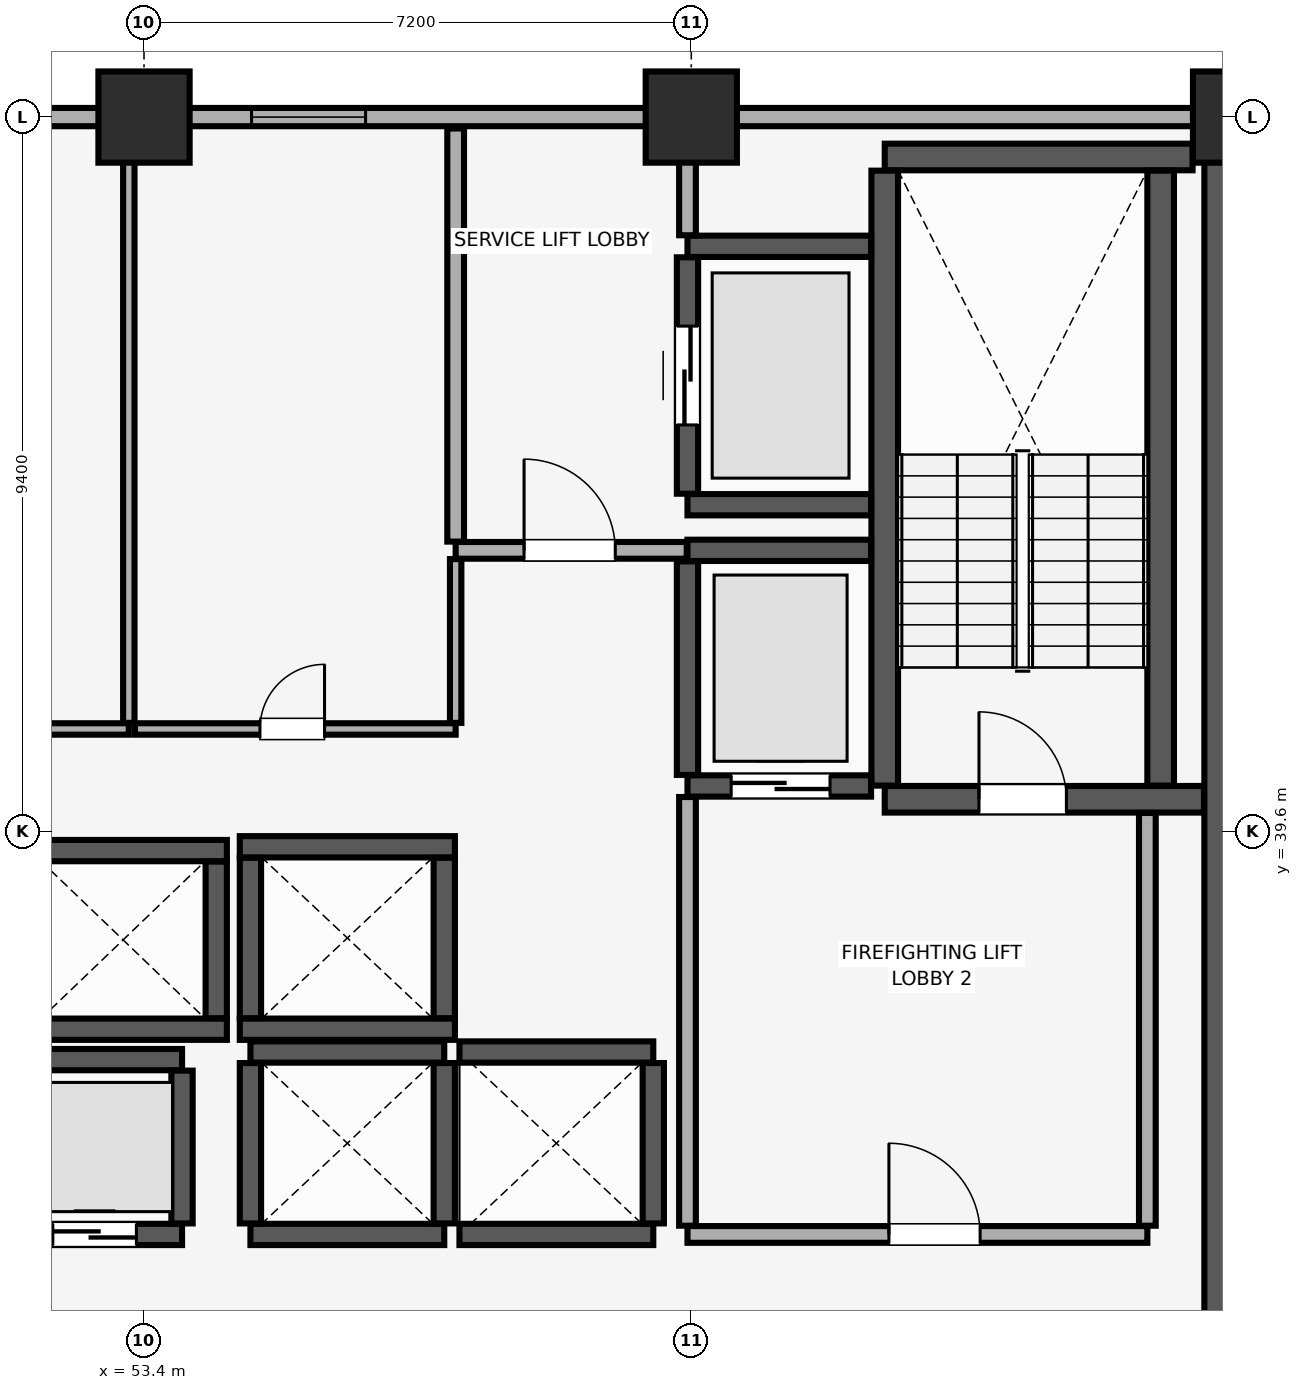
"""IFC4 building model, lengths in metres.
Left out: names, types, materials, properties, quantities, classifications, styles, units other than length and angle.
Written with IfcOpenShell. Run it as: python <this file> out.ifc"""

import sys

from ifc_helpers import new_model, si_unit, direction, frame, frame_2d, origin, origin_2d, place, context, subcontext, project, spatial, rectangle, extrude, element, fill, save


model = new_model("IFC4")
c1 = context("Model", 3, precision=1e-05, world=origin(), true_north=direction((0.0, 1.0)))
c2 = subcontext(c1, "Body", "Model", "MODEL_VIEW")
j1 = project(units=[si_unit("LENGTHUNIT", "METRE"), si_unit("PLANEANGLEUNIT", "RADIAN")], contexts=[c1])
p1 = place(None, origin())
s1 = spatial("IfcSite", under=j1, at=p1, CompositionType="ELEMENT")
p2 = place(p1, origin())
s2 = spatial("IfcBuilding", under=s1, at=p2, CompositionType="ELEMENT")
p3 = place(p2, frame((0.0, 0.0, 135.35)))
s3 = spatial("IfcBuildingStorey", under=s2, at=p3, CompositionType="ELEMENT", Elevation=135.35)
for number, where, z_axis, x_axis in (
    (1, (53.4, 49.0, 0.0), (0.0, 0.0, 1.0), (1.0, 0.0, 0.0)),
    (2, (60.6, 49.0, 0.0), (0.0, 0.0, 1.0), (1.0, 0.0, 0.0)),
    (3, (67.8, 49.0, 0.0), (0.0, 0.0, 1.0), (1.0, 0.0, 0.0)),
):
    element("IfcColumn", number, at=place(p3, frame(where, z_axis=z_axis, x_axis=x_axis)), inside=s3, PredefinedType="COLUMN", context=c2, shape_type="SweptSolid", body=[
        extrude(rectangle(XDim=1.2, YDim=1.2, at=origin_2d()), origin(), (0.0, 0.0, 1.0), 3.56),
    ])
p4 = place(p3, frame((77.0, 49.0, 0.0), z_axis=(0.0, 0.0, 1.0), x_axis=(-1.0, 0.0, 0.0)))
e4 = element("IfcWall", 4, at=p4, inside=s3, PredefinedType="SOLIDWALL", context=c2, shape_type="SweptSolid", body=[
    extrude(rectangle(XDim=70.0, YDim=0.24, at=frame_2d((35.0, 0.0))), origin(), (0.0, 0.0, 1.0), 2.61),
])
p5 = place(p4, frame((63.7, 0.0, 0.85)))
e5 = element("IfcOpeningElement", 5, at=p5, cuts=e4, PredefinedType="OPENING", context=c2, shape_type="SweptSolid", body=[
    extrude(rectangle(XDim=3.0, YDim=1.5, at=frame_2d((1.5, 0.75))), frame((0.0, 0.13, 0.0), z_axis=(0.0, -1.0, 0.0), x_axis=(1.0, 0.0, 0.0)), (0.0, 0.0, 1.0), 0.26),
])
p6 = place(p4, frame((3.3, 0.0, 0.85)))
e6 = element("IfcOpeningElement", 6, at=p6, cuts=e4, PredefinedType="OPENING", context=c2, shape_type="SweptSolid", body=[
    extrude(rectangle(XDim=3.0, YDim=1.5, at=frame_2d((1.5, 0.75))), frame((0.0, 0.13, 0.0), z_axis=(0.0, -1.0, 0.0), x_axis=(1.0, 0.0, 0.0)), (0.0, 0.0, 1.0), 0.26),
])
p7 = place(p4, frame((48.565, 0.0, 0.9)))
e7 = element("IfcOpeningElement", 7, at=p7, cuts=e4, PredefinedType="OPENING", context=c2, shape_type="SweptSolid", body=[
    extrude(rectangle(XDim=1.5, YDim=1.4, at=frame_2d((0.75, 0.7))), frame((0.0, 0.13, 0.0), z_axis=(0.0, -1.0, 0.0), x_axis=(1.0, 0.0, 0.0)), (0.0, 0.0, 1.0), 0.26),
])
p8 = place(p4, frame((41.75, 0.0, 0.9)))
e8 = element("IfcOpeningElement", 8, at=p8, cuts=e4, PredefinedType="OPENING", context=c2, shape_type="SweptSolid", body=[
    extrude(rectangle(XDim=1.5, YDim=1.4, at=frame_2d((0.75, 0.7))), frame((0.0, 0.13, 0.0), z_axis=(0.0, -1.0, 0.0), x_axis=(1.0, 0.0, 0.0)), (0.0, 0.0, 1.0), 0.26),
])
p9 = place(p4, frame((25.3, 0.0, 0.9)))
e9 = element("IfcOpeningElement", 9, at=p9, cuts=e4, PredefinedType="OPENING", context=c2, shape_type="SweptSolid", body=[
    extrude(rectangle(XDim=1.5, YDim=1.4, at=frame_2d((0.75, 0.7))), frame((0.0, 0.13, 0.0), z_axis=(0.0, -1.0, 0.0), x_axis=(1.0, 0.0, 0.0)), (0.0, 0.0, 1.0), 0.26),
])
p10 = place(p4, frame((20.685, 0.0, 0.9)))
e10 = element("IfcOpeningElement", 10, at=p10, cuts=e4, PredefinedType="OPENING", context=c2, shape_type="SweptSolid", body=[
    extrude(rectangle(XDim=1.5, YDim=1.4, at=frame_2d((0.75, 0.7))), frame((0.0, 0.13, 0.0), z_axis=(0.0, -1.0, 0.0), x_axis=(1.0, 0.0, 0.0)), (0.0, 0.0, 1.0), 0.26),
])
p11 = place(p3, frame((67.8, 29.4, 0.0), z_axis=(0.0, 0.0, 1.0), x_axis=(0.0, 1.0, 0.0)))
e11 = element("IfcWall", 11, at=p11, inside=s3, PredefinedType="SHEAR", context=c2, shape_type="SweptSolid", body=[
    extrude(rectangle(XDim=19.2, YDim=0.9, at=frame_2d((9.6, 0.0))), origin(), (0.0, 0.0, 1.0), 3.56),
])
p12 = place(p3, frame((63.145, 40.025, 0.0), z_axis=(0.0, 0.0, 1.0), x_axis=(1.0, 0.0, 0.0)))
e12 = element("IfcWall", 12, at=p12, inside=s3, PredefinedType="SHEAR", context=c2, shape_type="SweptSolid", body=[
    extrude(rectangle(XDim=4.2, YDim=0.35, at=frame_2d((2.1, 0.0))), origin(), (0.0, 0.0, 1.0), 3.56),
])
p13 = place(p12, frame((1.24, 0.0, 0.0)))
e13 = element("IfcOpeningElement", 13, at=p13, cuts=e12, PredefinedType="OPENING", context=c2, shape_type="SweptSolid", body=[
    extrude(rectangle(XDim=1.15, YDim=2.15, at=frame_2d((0.575, 1.075))), frame((0.0, 0.185, 0.0), z_axis=(0.0, -1.0, 0.0), x_axis=(1.0, 0.0, 0.0)), (0.0, 0.0, 1.0), 0.37),
])
p14 = place(p3, frame((63.145, 48.475, 0.0), z_axis=(0.0, 0.0, 1.0), x_axis=(1.0, 0.0, 0.0)))
e14 = element("IfcWall", 14, at=p14, inside=s3, PredefinedType="SHEAR", context=c2, shape_type="SweptSolid", body=[
    extrude(rectangle(XDim=4.05, YDim=0.35, at=frame_2d((2.025, 0.0))), origin(), (0.0, 0.0, 1.0), 3.56),
])
for number, where, z_axis, x_axis in (
    (15, (63.145, 40.205, 0.0), (0.0, 0.0, 1.0), (0.0, 1.0, 0.0)),
    (16, (66.775, 40.205, 0.0), (0.0, 0.0, 1.0), (0.0, 1.0, 0.0)),
):
    element("IfcWall", number, at=place(p3, frame(where, z_axis=z_axis, x_axis=x_axis)), inside=s3, PredefinedType="SHEAR", context=c2, shape_type="SweptSolid", body=[
        extrude(rectangle(XDim=8.09, YDim=0.35, at=frame_2d((4.045, 0.0))), origin(), (0.0, 0.0, 1.0), 3.56),
    ])
p15 = place(p3, frame((51.6, 34.3, 0.0), z_axis=(0.0, 0.0, 1.0), x_axis=(1.0, 0.0, 0.0)))
e17 = element("IfcWall", 17, at=p15, inside=s3, PredefinedType="SHEAR", context=c2, shape_type="SweptSolid", body=[
    extrude(rectangle(XDim=2.3, YDim=0.28, at=frame_2d((1.15, 0.0))), origin(), (0.0, 0.0, 1.0), 3.56),
])
p16 = place(p15, frame((0.6, 0.0, 0.0)))
e18 = element("IfcOpeningElement", 18, at=p16, cuts=e17, PredefinedType="OPENING", context=c2, shape_type="SweptSolid", body=[
    extrude(rectangle(XDim=1.1, YDim=2.2, at=frame_2d((0.55, 1.1))), frame((0.0, 0.15, 0.0), z_axis=(0.0, -1.0, 0.0), x_axis=(1.0, 0.0, 0.0)), (0.0, 0.0, 1.0), 0.3),
])
p17 = place(p3, frame((51.6, 36.6, 0.0), z_axis=(0.0, 0.0, 1.0), x_axis=(1.0, 0.0, 0.0)))
e19 = element("IfcWall", 19, at=p17, inside=s3, PredefinedType="SHEAR", context=c2, shape_type="SweptSolid", body=[
    extrude(rectangle(XDim=2.3, YDim=0.28, at=frame_2d((1.15, 0.0))), origin(), (0.0, 0.0, 1.0), 3.56),
])
p18 = place(p3, frame((53.9, 34.445, 0.0), z_axis=(0.0, 0.0, 1.0), x_axis=(0.0, 1.0, 0.0)))
e20 = element("IfcWall", 20, at=p18, inside=s3, PredefinedType="SHEAR", context=c2, shape_type="SweptSolid", body=[
    extrude(rectangle(XDim=2.01, YDim=0.28, at=frame_2d((1.005, 0.0))), origin(), (0.0, 0.0, 1.0), 3.56),
])
for number, where, z_axis, x_axis in (
    (21, (51.9, 37.0, 0.0), (0.0, 0.0, 1.0), (1.0, 0.0, 0.0)),
    (22, (51.9, 39.35, 0.0), (0.0, 0.0, 1.0), (1.0, 0.0, 0.0)),
):
    element("IfcWall", number, at=place(p3, frame(where, z_axis=z_axis, x_axis=x_axis)), inside=s3, PredefinedType="SHEAR", context=c2, shape_type="SweptSolid", body=[
        extrude(rectangle(XDim=2.59, YDim=0.28, at=frame_2d((1.295, 0.0))), origin(), (0.0, 0.0, 1.0), 3.56),
    ])
p19 = place(p3, frame((54.35, 37.145, 0.0), z_axis=(0.0, 0.0, 1.0), x_axis=(0.0, 1.0, 0.0)))
e23 = element("IfcWall", 23, at=p19, inside=s3, PredefinedType="SHEAR", context=c2, shape_type="SweptSolid", body=[
    extrude(rectangle(XDim=2.06, YDim=0.28, at=frame_2d((1.03, 0.0))), origin(), (0.0, 0.0, 1.0), 3.56),
])
for number, where, z_axis, x_axis in (
    (24, (54.8, 34.3, 0.0), (0.0, 0.0, 1.0), (1.0, 0.0, 0.0)),
    (25, (54.8, 36.7, 0.0), (0.0, 0.0, 1.0), (1.0, 0.0, 0.0)),
):
    element("IfcWall", number, at=place(p3, frame(where, z_axis=z_axis, x_axis=x_axis)), inside=s3, PredefinedType="SHEAR", context=c2, shape_type="SweptSolid", body=[
        extrude(rectangle(XDim=2.55, YDim=0.28, at=frame_2d((1.275, 0.0))), origin(), (0.0, 0.0, 1.0), 3.56),
    ])
for number, where, z_axis, x_axis in (
    (26, (54.8, 34.445, 0.0), (0.0, 0.0, 1.0), (0.0, 1.0, 0.0)),
    (27, (57.35, 34.445, 0.0), (0.0, 0.0, 1.0), (0.0, 1.0, 0.0)),
):
    element("IfcWall", number, at=place(p3, frame(where, z_axis=z_axis, x_axis=x_axis)), inside=s3, PredefinedType="SHEAR", context=c2, shape_type="SweptSolid", body=[
        extrude(rectangle(XDim=2.11, YDim=0.28, at=frame_2d((1.055, 0.0))), origin(), (0.0, 0.0, 1.0), 3.56),
    ])
for number, where, z_axis, x_axis in (
    (28, (57.55, 34.3, 0.0), (0.0, 0.0, 1.0), (1.0, 0.0, 0.0)),
    (29, (57.55, 36.7, 0.0), (0.0, 0.0, 1.0), (1.0, 0.0, 0.0)),
):
    element("IfcWall", number, at=place(p3, frame(where, z_axis=z_axis, x_axis=x_axis)), inside=s3, PredefinedType="SHEAR", context=c2, shape_type="SweptSolid", body=[
        extrude(rectangle(XDim=2.55, YDim=0.28, at=frame_2d((1.275, 0.0))), origin(), (0.0, 0.0, 1.0), 3.56),
    ])
p20 = place(p3, frame((60.1, 34.445, 0.0), z_axis=(0.0, 0.0, 1.0), x_axis=(0.0, 1.0, 0.0)))
e30 = element("IfcWall", 30, at=p20, inside=s3, PredefinedType="SHEAR", context=c2, shape_type="SweptSolid", body=[
    extrude(rectangle(XDim=2.11, YDim=0.28, at=frame_2d((1.055, 0.0))), origin(), (0.0, 0.0, 1.0), 3.56),
])
for number, where, z_axis, x_axis in (
    (31, (54.66, 37.0, 0.0), (0.0, 0.0, 1.0), (1.0, 0.0, 0.0)),
    (32, (54.66, 39.4, 0.0), (0.0, 0.0, 1.0), (1.0, 0.0, 0.0)),
):
    element("IfcWall", number, at=place(p3, frame(where, z_axis=z_axis, x_axis=x_axis)), inside=s3, PredefinedType="SHEAR", context=c2, shape_type="SweptSolid", body=[
        extrude(rectangle(XDim=2.83, YDim=0.28, at=frame_2d((1.415, 0.0))), origin(), (0.0, 0.0, 1.0), 3.56),
    ])
for number, where, z_axis, x_axis in (
    (33, (54.8, 37.145, 0.0), (0.0, 0.0, 1.0), (0.0, 1.0, 0.0)),
    (34, (57.35, 37.145, 0.0), (0.0, 0.0, 1.0), (0.0, 1.0, 0.0)),
):
    element("IfcWall", number, at=place(p3, frame(where, z_axis=z_axis, x_axis=x_axis)), inside=s3, PredefinedType="SHEAR", context=c2, shape_type="SweptSolid", body=[
        extrude(rectangle(XDim=2.11, YDim=0.28, at=frame_2d((1.055, 0.0))), origin(), (0.0, 0.0, 1.0), 3.56),
    ])
p21 = place(p3, frame((60.55, 40.2, 0.0), z_axis=(0.0, 0.0, 1.0), x_axis=(1.0, 0.0, 0.0)))
e35 = element("IfcWall", 35, at=p21, inside=s3, PredefinedType="SHEAR", context=c2, shape_type="SweptSolid", body=[
    extrude(rectangle(XDim=2.415, YDim=0.28, at=frame_2d((1.208, 0.0))), origin(), (0.0, 0.0, 1.0), 3.56),
])
p22 = place(p21, frame((0.575, 0.0, 0.0)))
e36 = element("IfcOpeningElement", 36, at=p22, cuts=e35, PredefinedType="OPENING", context=c2, shape_type="SweptSolid", body=[
    extrude(rectangle(XDim=1.3, YDim=2.3, at=frame_2d((0.65, 1.15))), frame((0.0, 0.15, 0.0), z_axis=(0.0, -1.0, 0.0), x_axis=(1.0, 0.0, 0.0)), (0.0, 0.0, 1.0), 0.3),
])
p23 = place(p3, frame((60.55, 43.3, 0.0), z_axis=(0.0, 0.0, 1.0), x_axis=(1.0, 0.0, 0.0)))
e37 = element("IfcWall", 37, at=p23, inside=s3, PredefinedType="SHEAR", context=c2, shape_type="SweptSolid", body=[
    extrude(rectangle(XDim=2.415, YDim=0.28, at=frame_2d((1.208, 0.0))), origin(), (0.0, 0.0, 1.0), 3.56),
])
p24 = place(p3, frame((60.55, 40.345, 0.0), z_axis=(0.0, 0.0, 1.0), x_axis=(0.0, 1.0, 0.0)))
e38 = element("IfcWall", 38, at=p24, inside=s3, PredefinedType="SHEAR", context=c2, shape_type="SweptSolid", body=[
    extrude(rectangle(XDim=2.81, YDim=0.28, at=frame_2d((1.405, 0.0))), origin(), (0.0, 0.0, 1.0), 3.56),
])
for number, where, z_axis, x_axis in (
    (39, (60.55, 43.9, 0.0), (0.0, 0.0, 1.0), (1.0, 0.0, 0.0)),
    (40, (60.55, 47.3, 0.0), (0.0, 0.0, 1.0), (1.0, 0.0, 0.0)),
):
    element("IfcWall", number, at=place(p3, frame(where, z_axis=z_axis, x_axis=x_axis)), inside=s3, PredefinedType="SHEAR", context=c2, shape_type="SweptSolid", body=[
        extrude(rectangle(XDim=2.415, YDim=0.28, at=frame_2d((1.208, 0.0))), origin(), (0.0, 0.0, 1.0), 3.56),
    ])
p25 = place(p3, frame((60.55, 44.045, 0.0), z_axis=(0.0, 0.0, 1.0), x_axis=(0.0, 1.0, 0.0)))
e41 = element("IfcWall", 41, at=p25, inside=s3, PredefinedType="SHEAR", context=c2, shape_type="SweptSolid", body=[
    extrude(rectangle(XDim=3.11, YDim=0.28, at=frame_2d((1.555, 0.0))), origin(), (0.0, 0.0, 1.0), 3.56),
])
p26 = place(p25, frame((0.905, 0.0, 0.0)))
e42 = element("IfcOpeningElement", 42, at=p26, cuts=e41, PredefinedType="OPENING", context=c2, shape_type="SweptSolid", body=[
    extrude(rectangle(XDim=1.3, YDim=2.3, at=frame_2d((0.65, 1.15))), frame((0.0, 0.15, 0.0), z_axis=(0.0, -1.0, 0.0), x_axis=(1.0, 0.0, 0.0)), (0.0, 0.0, 1.0), 0.3),
])
p27 = place(p3, frame((60.55, 34.3, 0.0), z_axis=(0.0, 0.0, 1.0), x_axis=(1.0, 0.0, 0.0)))
e43 = element("IfcWall", 43, at=p27, inside=s3, PredefinedType="PARTITIONING", context=c2, shape_type="SweptSolid", body=[
    extrude(rectangle(XDim=6.05, YDim=0.22, at=frame_2d((3.025, 0.0))), origin(), (0.0, 0.0, 1.0), 3.56),
])
p28 = place(p27, frame((2.65, 0.0, 0.0)))
e44 = element("IfcOpeningElement", 44, at=p28, cuts=e43, PredefinedType="OPENING", context=c2, shape_type="SweptSolid", body=[
    extrude(rectangle(XDim=1.2, YDim=2.15, at=frame_2d((0.6, 1.075))), frame((0.0, 0.12, 0.0), z_axis=(0.0, -1.0, 0.0), x_axis=(1.0, 0.0, 0.0)), (0.0, 0.0, 1.0), 0.24),
])
p29 = place(p3, frame((60.55, 34.415, 0.0), z_axis=(0.0, 0.0, 1.0), x_axis=(0.0, 1.0, 0.0)))
e45 = element("IfcWall", 45, at=p29, inside=s3, PredefinedType="PARTITIONING", context=c2, shape_type="SweptSolid", body=[
    extrude(rectangle(XDim=5.64, YDim=0.22, at=frame_2d((2.82, 0.0))), origin(), (0.0, 0.0, 1.0), 3.56),
])
p30 = place(p3, frame((66.6, 34.415, 0.0), z_axis=(0.0, 0.0, 1.0), x_axis=(0.0, 1.0, 0.0)))
e46 = element("IfcWall", 46, at=p30, inside=s3, PredefinedType="PARTITIONING", context=c2, shape_type="SweptSolid", body=[
    extrude(rectangle(XDim=5.43, YDim=0.22, at=frame_2d((2.715, 0.0))), origin(), (0.0, 0.0, 1.0), 3.56),
])
p31 = place(p3, frame((57.5, 43.3, 0.0), z_axis=(0.0, 0.0, 1.0), x_axis=(1.0, 0.0, 0.0)))
e47 = element("IfcWall", 47, at=p31, inside=s3, PredefinedType="PARTITIONING", context=c2, shape_type="SweptSolid", body=[
    extrude(rectangle(XDim=3.04, YDim=0.22, at=frame_2d((1.52, 0.0))), origin(), (0.0, 0.0, 1.0), 3.56),
])
p32 = place(p31, frame((0.9, 0.0, 0.0)))
e48 = element("IfcOpeningElement", 48, at=p32, cuts=e47, PredefinedType="OPENING", context=c2, shape_type="SweptSolid", body=[
    extrude(rectangle(XDim=1.2, YDim=2.15, at=frame_2d((0.6, 1.075))), frame((0.0, 0.12, 0.0), z_axis=(0.0, -1.0, 0.0), x_axis=(1.0, 0.0, 0.0)), (0.0, 0.0, 1.0), 0.24),
])
p33 = place(p3, frame((57.5, 43.415, 0.0), z_axis=(0.0, 0.0, 1.0), x_axis=(0.0, 1.0, 0.0)))
e49 = element("IfcWall", 49, at=p33, inside=s3, PredefinedType="PARTITIONING", context=c2, shape_type="SweptSolid", body=[
    extrude(rectangle(XDim=5.435, YDim=0.22, at=frame_2d((2.718, 0.0))), origin(), (0.0, 0.0, 1.0), 3.56),
])
p34 = place(p3, frame((60.55, 47.445, 0.0), z_axis=(0.0, 0.0, 1.0), x_axis=(0.0, 1.0, 0.0)))
e50 = element("IfcWall", 50, at=p34, inside=s3, PredefinedType="PARTITIONING", context=c2, shape_type="SweptSolid", body=[
    extrude(rectangle(XDim=1.405, YDim=0.22, at=frame_2d((0.703, 0.0))), origin(), (0.0, 0.0, 1.0), 3.56),
])
p35 = place(p3, frame((48.968, 40.95, 0.0), z_axis=(0.0, 0.0, 1.0), x_axis=(1.0, 0.0, 0.0)))
e51 = element("IfcWall", 51, at=p35, inside=s3, PredefinedType="PARTITIONING", context=c2, shape_type="SweptSolid", body=[
    extrude(rectangle(XDim=4.232, YDim=0.15, at=frame_2d((2.116, 0.0))), origin(), (0.0, 0.0, 1.0), 3.56),
])
p36 = place(p35, frame((1.657, 0.0, 0.0)))
e52 = element("IfcOpeningElement", 52, at=p36, cuts=e51, PredefinedType="OPENING", context=c2, shape_type="SweptSolid", body=[
    extrude(rectangle(XDim=0.85, YDim=2.1, at=frame_2d((0.425, 1.05))), frame((0.0, 0.085, 0.0), z_axis=(0.0, -1.0, 0.0), x_axis=(1.0, 0.0, 0.0)), (0.0, 0.0, 1.0), 0.17),
])
p37 = place(p3, frame((53.2, 41.03, 0.0), z_axis=(0.0, 0.0, 1.0), x_axis=(0.0, 1.0, 0.0)))
e53 = element("IfcWall", 53, at=p37, inside=s3, PredefinedType="PARTITIONING", context=c2, shape_type="SweptSolid", body=[
    extrude(rectangle(XDim=7.82, YDim=0.15, at=frame_2d((3.91, 0.0))), origin(), (0.0, 0.0, 1.0), 3.56),
])
p38 = place(p3, frame((53.28, 40.95, 0.0), z_axis=(0.0, 0.0, 1.0), x_axis=(1.0, 0.0, 0.0)))
e54 = element("IfcWall", 54, at=p38, inside=s3, PredefinedType="PARTITIONING", context=c2, shape_type="SweptSolid", body=[
    extrude(rectangle(XDim=4.22, YDim=0.15, at=frame_2d((2.11, 0.0))), origin(), (0.0, 0.0, 1.0), 3.56),
])
p39 = place(p38, frame((1.645, 0.0, 0.0)))
e55 = element("IfcOpeningElement", 55, at=p39, cuts=e54, PredefinedType="OPENING", context=c2, shape_type="SweptSolid", body=[
    extrude(rectangle(XDim=0.85, YDim=2.1, at=frame_2d((0.425, 1.05))), frame((0.0, 0.085, 0.0), z_axis=(0.0, -1.0, 0.0), x_axis=(1.0, 0.0, 0.0)), (0.0, 0.0, 1.0), 0.17),
])
p40 = place(p3, frame((57.5, 41.03, 0.0), z_axis=(0.0, 0.0, 1.0), x_axis=(0.0, 1.0, 0.0)))
e56 = element("IfcWall", 56, at=p40, inside=s3, PredefinedType="PARTITIONING", context=c2, shape_type="SweptSolid", body=[
    extrude(rectangle(XDim=2.155, YDim=0.15, at=frame_2d((1.078, 0.0))), origin(), (0.0, 0.0, 1.0), 3.56),
])
p41 = place(p10, origin())
e57 = element("IfcWindow", 57, at=p41, inside=s3, PartitioningType="SINGLE_PANEL", PredefinedType="WINDOW", context=c2, shape_type="SweptSolid", body=[
    extrude(rectangle(XDim=1.5, YDim=1.4, at=frame_2d((0.75, 0.7))), frame((0.0, 0.03, 0.0), z_axis=(0.0, -1.0, 0.0), x_axis=(1.0, 0.0, 0.0)), (0.0, 0.0, 1.0), 0.06),
])
fill(e10, e57)
p42 = place(p13, origin())
e58 = element("IfcDoor", 58, at=p42, inside=s3, OperationType="SINGLE_SWING_LEFT", PredefinedType="DOOR", context=c2, shape_type="SweptSolid", body=[
    extrude(rectangle(XDim=1.15, YDim=2.15, at=frame_2d((0.575, 1.075))), frame((0.0, 0.025, 0.0), z_axis=(0.0, -1.0, 0.0), x_axis=(1.0, 0.0, 0.0)), (0.0, 0.0, 1.0), 0.05),
])
fill(e13, e58)
p43 = place(p16, origin())
e59 = element("IfcDoor", 59, at=p43, inside=s3, OperationType="DOUBLE_DOOR_SLIDING", PredefinedType="DOOR", context=c2, shape_type="SweptSolid", body=[
    extrude(rectangle(XDim=1.1, YDim=2.2, at=frame_2d((0.55, 1.1))), frame((0.0, 0.025, 0.0), z_axis=(0.0, -1.0, 0.0), x_axis=(1.0, 0.0, 0.0)), (0.0, 0.0, 1.0), 0.05),
])
fill(e18, e59)
p44 = place(p22, origin())
e60 = element("IfcDoor", 60, at=p44, inside=s3, OperationType="DOUBLE_DOOR_SLIDING", PredefinedType="DOOR", context=c2, shape_type="SweptSolid", body=[
    extrude(rectangle(XDim=1.3, YDim=2.3, at=frame_2d((0.65, 1.15))), frame((0.0, 0.025, 0.0), z_axis=(0.0, -1.0, 0.0), x_axis=(1.0, 0.0, 0.0)), (0.0, 0.0, 1.0), 0.05),
])
fill(e36, e60)
p45 = place(p26, origin())
e61 = element("IfcDoor", 61, at=p45, inside=s3, OperationType="DOUBLE_DOOR_SLIDING", PredefinedType="DOOR", context=c2, shape_type="SweptSolid", body=[
    extrude(rectangle(XDim=1.3, YDim=2.3, at=frame_2d((0.65, 1.15))), frame((0.0, 0.025, 0.0), z_axis=(0.0, -1.0, 0.0), x_axis=(1.0, 0.0, 0.0)), (0.0, 0.0, 1.0), 0.05),
])
fill(e42, e61)
p46 = place(p28, origin())
e62 = element("IfcDoor", 62, at=p46, inside=s3, OperationType="SINGLE_SWING_LEFT", PredefinedType="DOOR", context=c2, shape_type="SweptSolid", body=[
    extrude(rectangle(XDim=1.2, YDim=2.15, at=frame_2d((0.6, 1.075))), frame((0.0, 0.025, 0.0), z_axis=(0.0, -1.0, 0.0), x_axis=(1.0, 0.0, 0.0)), (0.0, 0.0, 1.0), 0.05),
])
fill(e44, e62)
p47 = place(p32, origin())
e63 = element("IfcDoor", 63, at=p47, inside=s3, OperationType="SINGLE_SWING_LEFT", PredefinedType="DOOR", context=c2, shape_type="SweptSolid", body=[
    extrude(rectangle(XDim=1.2, YDim=2.15, at=frame_2d((0.6, 1.075))), frame((0.0, 0.025, 0.0), z_axis=(0.0, -1.0, 0.0), x_axis=(1.0, 0.0, 0.0)), (0.0, 0.0, 1.0), 0.05),
])
fill(e48, e63)
p48 = place(p39, origin())
e64 = element("IfcDoor", 64, at=p48, inside=s3, OperationType="SINGLE_SWING_RIGHT", PredefinedType="DOOR", context=c2, shape_type="SweptSolid", body=[
    extrude(rectangle(XDim=0.85, YDim=2.1, at=frame_2d((0.425, 1.05))), frame((0.0, 0.025, 0.0), z_axis=(0.0, -1.0, 0.0), x_axis=(1.0, 0.0, 0.0)), (0.0, 0.0, 1.0), 0.05),
])
fill(e55, e64)
save(model, sys.argv[1])
